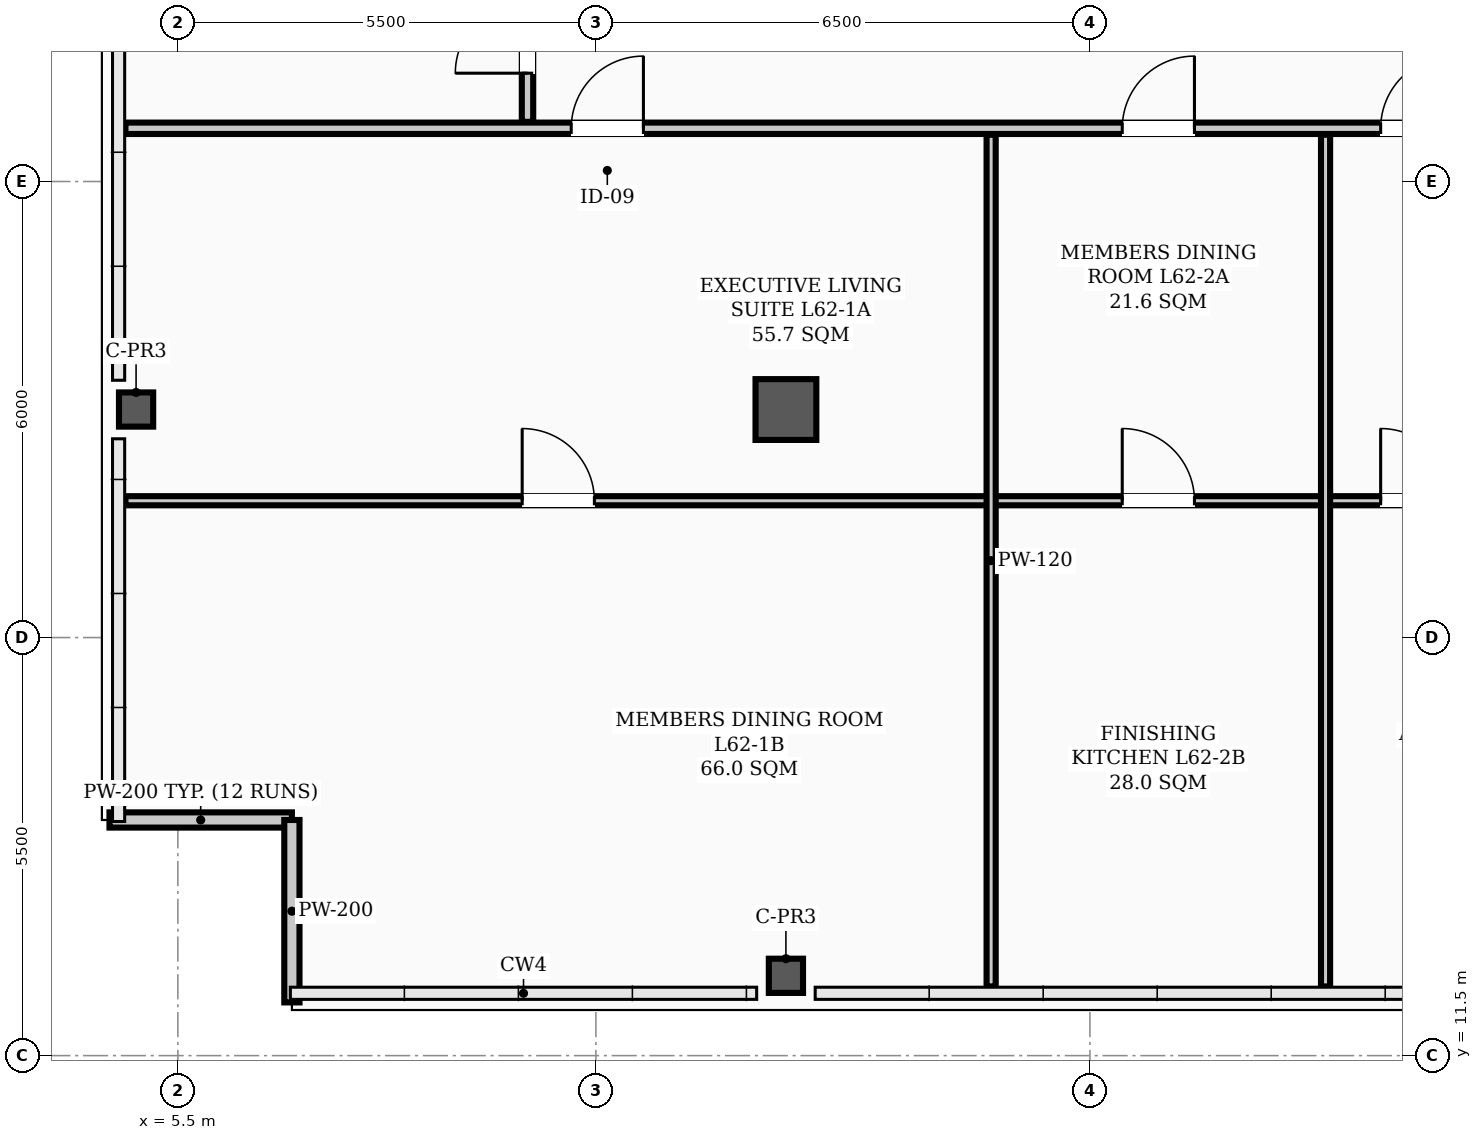
"""IFC4 building model, lengths in metres.
Left out: names, types, materials, properties, quantities, classifications, styles, units other than length and angle.
Written with IfcOpenShell. Run it as: python <this file> out.ifc"""

import sys

from ifc_helpers import new_model, si_unit, direction, frame, frame_2d, origin, origin_2d, place, context, subcontext, project, spatial, rectangle, hollow_rectangle, extrude, element, fill, save


model = new_model("IFC4")
c1 = context("Model", 3, precision=1e-05, world=origin(), true_north=direction((0.0, 1.0)))
c2 = subcontext(c1, "Body", "Model", "MODEL_VIEW")
j1 = project(units=[si_unit("LENGTHUNIT", "METRE"), si_unit("PLANEANGLEUNIT", "RADIAN")], contexts=[c1])
p1 = place(None, origin())
s1 = spatial("IfcSite", under=j1, at=p1, CompositionType="ELEMENT")
p2 = place(p1, origin())
s2 = spatial("IfcBuilding", under=s1, at=p2, CompositionType="ELEMENT")
p3 = place(p2, frame((0.0, 0.0, 250.1)))
s3 = spatial("IfcBuildingStorey", under=s2, at=p3, CompositionType="ELEMENT", Elevation=250.1)
p4 = place(p3, frame((13.5, 20.0, 0.0), z_axis=(0.0, 0.0, 1.0), x_axis=(1.0, 0.0, 0.0)))
e1 = element("IfcColumn", 1, at=p4, inside=s3, PredefinedType="COLUMN", context=c2, shape_type="SweptSolid", body=[
    extrude(hollow_rectangle(XDim=0.8, YDim=0.8, WallThickness=0.032, InnerFilletRadius=0.016, OuterFilletRadius=0.048, at=origin_2d()), origin(), (0.0, 0.0, 1.0), 3.9),
])
for number, where, z_axis, x_axis in (
    (2, (4.95, 20.0, 0.0), (0.0, 0.0, 1.0), (1.0, 0.0, 0.0)),
    (3, (13.5, 12.55, 0.0), (0.0, 0.0, 1.0), (1.0, 0.0, 0.0)),
):
    element("IfcColumn", number, at=place(p3, frame(where, z_axis=z_axis, x_axis=x_axis)), inside=s3, PredefinedType="COLUMN", context=c2, shape_type="SweptSolid", body=[
        extrude(hollow_rectangle(XDim=0.45, YDim=0.45, WallThickness=0.022, InnerFilletRadius=0.022, OuterFilletRadius=0.044, at=origin_2d()), origin(), (0.0, 0.0, 1.0), 3.9),
    ])
p5 = place(p3, frame((4.6, 14.6, 0.0), z_axis=(0.0, 0.0, 1.0), x_axis=(1.0, 0.0, 0.0)))
e4 = element("IfcWall", 4, at=p5, inside=s3, PredefinedType="PARAPET", context=c2, shape_type="SweptSolid", body=[
    extrude(rectangle(XDim=2.4, YDim=0.2, at=frame_2d((1.2, 0.0))), origin(), (0.0, 0.0, 1.0), 1.2),
])
p6 = place(p3, frame((7.0, 14.6, 0.0), z_axis=(0.0, 0.0, 1.0), x_axis=(0.0, -1.0, 0.0)))
e5 = element("IfcWall", 5, at=p6, inside=s3, PredefinedType="PARAPET", context=c2, shape_type="SweptSolid", body=[
    extrude(rectangle(XDim=2.4, YDim=0.2, at=frame_2d((1.2, 0.0))), origin(), (0.0, 0.0, 1.0), 1.2),
])
p7 = place(p3, frame((4.81, 23.7, 0.0), z_axis=(0.0, 0.0, 1.0), x_axis=(1.0, 0.0, 0.0)))
e6 = element("IfcWall", 6, at=p7, inside=s3, PredefinedType="PARTITIONING", context=c2, shape_type="SweptSolid", body=[
    extrude(rectangle(XDim=40.88, YDim=0.15, at=frame_2d((20.44, 0.0))), origin(), (0.0, 0.0, 1.0), 3.2),
])
p8 = place(p7, frame((5.865, 0.0, 0.0)))
e7 = element("IfcOpeningElement", 7, at=p8, cuts=e6, PredefinedType="OPENING", context=c2, shape_type="SweptSolid", body=[
    extrude(rectangle(XDim=0.95, YDim=2.08, at=frame_2d((0.475, 1.04))), frame((0.0, 0.085, 0.0), z_axis=(0.0, -1.0, 0.0), x_axis=(1.0, 0.0, 0.0)), (0.0, 0.0, 1.0), 0.17),
])
p9 = place(p7, frame((13.115, 0.0, 0.0)))
e8 = element("IfcOpeningElement", 8, at=p9, cuts=e6, PredefinedType="OPENING", context=c2, shape_type="SweptSolid", body=[
    extrude(rectangle(XDim=0.95, YDim=2.08, at=frame_2d((0.475, 1.04))), frame((0.0, 0.085, 0.0), z_axis=(0.0, -1.0, 0.0), x_axis=(1.0, 0.0, 0.0)), (0.0, 0.0, 1.0), 0.17),
])
p10 = place(p7, frame((16.515, 0.0, 0.0)))
e9 = element("IfcOpeningElement", 9, at=p10, cuts=e6, PredefinedType="OPENING", context=c2, shape_type="SweptSolid", body=[
    extrude(rectangle(XDim=0.95, YDim=2.08, at=frame_2d((0.475, 1.04))), frame((0.0, 0.085, 0.0), z_axis=(0.0, -1.0, 0.0), x_axis=(1.0, 0.0, 0.0)), (0.0, 0.0, 1.0), 0.17),
])
p11 = place(p7, frame((22.915, 0.0, 0.0)))
e10 = element("IfcOpeningElement", 10, at=p11, cuts=e6, PredefinedType="OPENING", context=c2, shape_type="SweptSolid", body=[
    extrude(rectangle(XDim=0.95, YDim=2.08, at=frame_2d((0.475, 1.04))), frame((0.0, 0.085, 0.0), z_axis=(0.0, -1.0, 0.0), x_axis=(1.0, 0.0, 0.0)), (0.0, 0.0, 1.0), 0.17),
])
p12 = place(p7, frame((29.115, 0.0, 0.0)))
e11 = element("IfcOpeningElement", 11, at=p12, cuts=e6, PredefinedType="OPENING", context=c2, shape_type="SweptSolid", body=[
    extrude(rectangle(XDim=0.95, YDim=2.08, at=frame_2d((0.475, 1.04))), frame((0.0, 0.085, 0.0), z_axis=(0.0, -1.0, 0.0), x_axis=(1.0, 0.0, 0.0)), (0.0, 0.0, 1.0), 0.17),
])
p13 = place(p7, frame((34.215, 0.0, 0.0)))
e12 = element("IfcOpeningElement", 12, at=p13, cuts=e6, PredefinedType="OPENING", context=c2, shape_type="SweptSolid", body=[
    extrude(rectangle(XDim=0.95, YDim=2.08, at=frame_2d((0.475, 1.04))), frame((0.0, 0.085, 0.0), z_axis=(0.0, -1.0, 0.0), x_axis=(1.0, 0.0, 0.0)), (0.0, 0.0, 1.0), 0.17),
])
p14 = place(p7, frame((38.46, 0.0, 0.0)))
e13 = element("IfcOpeningElement", 13, at=p14, cuts=e6, PredefinedType="OPENING", context=c2, shape_type="SweptSolid", body=[
    extrude(rectangle(XDim=0.95, YDim=2.08, at=frame_2d((0.475, 1.04))), frame((0.0, 0.085, 0.0), z_axis=(0.0, -1.0, 0.0), x_axis=(1.0, 0.0, 0.0)), (0.0, 0.0, 1.0), 0.17),
])
p15 = place(p3, frame((4.81, 18.8, 0.0), z_axis=(0.0, 0.0, 1.0), x_axis=(1.0, 0.0, 0.0)))
e14 = element("IfcWall", 14, at=p15, inside=s3, PredefinedType="PARTITIONING", context=c2, shape_type="SweptSolid", body=[
    extrude(rectangle(XDim=11.39, YDim=0.12, at=frame_2d((5.695, 0.0))), origin(), (0.0, 0.0, 1.0), 3.2),
])
p16 = place(p15, frame((5.22, 0.0, 0.0)))
e15 = element("IfcOpeningElement", 15, at=p16, cuts=e14, PredefinedType="OPENING", context=c2, shape_type="SweptSolid", body=[
    extrude(rectangle(XDim=0.95, YDim=2.08, at=frame_2d((0.475, 1.04))), frame((0.0, 0.07, 0.0), z_axis=(0.0, -1.0, 0.0), x_axis=(1.0, 0.0, 0.0)), (0.0, 0.0, 1.0), 0.14),
])
p17 = place(p3, frame((16.2, 18.8, 0.0), z_axis=(0.0, 0.0, 1.0), x_axis=(1.0, 0.0, 0.0)))
e16 = element("IfcWall", 16, at=p17, inside=s3, PredefinedType="PARTITIONING", context=c2, shape_type="SweptSolid", body=[
    extrude(rectangle(XDim=4.4, YDim=0.12, at=frame_2d((2.2, 0.0))), origin(), (0.0, 0.0, 1.0), 3.35),
])
p18 = place(p17, frame((1.725, 0.0, 0.0)))
e17 = element("IfcOpeningElement", 17, at=p18, cuts=e16, PredefinedType="OPENING", context=c2, shape_type="SweptSolid", body=[
    extrude(rectangle(XDim=0.95, YDim=2.08, at=frame_2d((0.475, 1.04))), frame((0.0, 0.07, 0.0), z_axis=(0.0, -1.0, 0.0), x_axis=(1.0, 0.0, 0.0)), (0.0, 0.0, 1.0), 0.14),
])
p19 = place(p3, frame((20.6, 18.8, 0.0), z_axis=(0.0, 0.0, 1.0), x_axis=(1.0, 0.0, 0.0)))
e18 = element("IfcWall", 18, at=p19, inside=s3, PredefinedType="PARTITIONING", context=c2, shape_type="SweptSolid", body=[
    extrude(rectangle(XDim=4.2, YDim=0.12, at=frame_2d((2.1, 0.0))), origin(), (0.0, 0.0, 1.0), 3.2),
])
p20 = place(p19, frame((0.725, 0.0, 0.0)))
e19 = element("IfcOpeningElement", 19, at=p20, cuts=e18, PredefinedType="OPENING", context=c2, shape_type="SweptSolid", body=[
    extrude(rectangle(XDim=0.95, YDim=2.08, at=frame_2d((0.475, 1.04))), frame((0.0, 0.07, 0.0), z_axis=(0.0, -1.0, 0.0), x_axis=(1.0, 0.0, 0.0)), (0.0, 0.0, 1.0), 0.14),
])
p21 = place(p3, frame((10.1, 23.785, 0.0), z_axis=(0.0, 0.0, 1.0), x_axis=(0.0, 1.0, 0.0)))
e20 = element("IfcWall", 20, at=p21, inside=s3, PredefinedType="PARTITIONING", context=c2, shape_type="SweptSolid", body=[
    extrude(rectangle(XDim=12.28, YDim=0.15, at=frame_2d((6.14, 0.0))), origin(), (0.0, 0.0, 1.0), 3.1),
])
p22 = place(p21, frame((0.64, 0.0, 0.0)))
e21 = element("IfcOpeningElement", 21, at=p22, cuts=e20, PredefinedType="OPENING", context=c2, shape_type="SweptSolid", body=[
    extrude(rectangle(XDim=0.95, YDim=2.08, at=frame_2d((0.475, 1.04))), frame((0.0, 0.085, 0.0), z_axis=(0.0, -1.0, 0.0), x_axis=(1.0, 0.0, 0.0)), (0.0, 0.0, 1.0), 0.17),
])
for number, where, z_axis, x_axis in (
    (22, (16.2, 12.41, 0.0), (0.0, 0.0, 1.0), (0.0, 1.0, 0.0)),
    (23, (20.6, 12.41, 0.0), (0.0, 0.0, 1.0), (0.0, 1.0, 0.0)),
):
    element("IfcWall", number, at=place(p3, frame(where, z_axis=z_axis, x_axis=x_axis)), inside=s3, PredefinedType="PARTITIONING", context=c2, shape_type="SweptSolid", body=[
        extrude(rectangle(XDim=11.205, YDim=0.12, at=frame_2d((5.603, 0.0))), origin(), (0.0, 0.0, 1.0), 3.1),
    ])
p23 = place(p16, origin())
e24 = element("IfcDoor", 24, at=p23, inside=s3, OperationType="SINGLE_SWING_LEFT", PredefinedType="DOOR", context=c2, shape_type="SweptSolid", body=[
    extrude(rectangle(XDim=0.95, YDim=2.08, at=frame_2d((0.475, 1.04))), frame((0.0, 0.025, 0.0), z_axis=(0.0, -1.0, 0.0), x_axis=(1.0, 0.0, 0.0)), (0.0, 0.0, 1.0), 0.05),
])
fill(e15, e24)
p24 = place(p8, origin())
e25 = element("IfcDoor", 25, at=p24, inside=s3, OperationType="SINGLE_SWING_RIGHT", PredefinedType="DOOR", context=c2, shape_type="SweptSolid", body=[
    extrude(rectangle(XDim=0.95, YDim=2.08, at=frame_2d((0.475, 1.04))), frame((0.0, 0.025, 0.0), z_axis=(0.0, -1.0, 0.0), x_axis=(1.0, 0.0, 0.0)), (0.0, 0.0, 1.0), 0.05),
])
fill(e7, e25)
p25 = place(p18, origin())
e26 = element("IfcDoor", 26, at=p25, inside=s3, OperationType="SINGLE_SWING_LEFT", PredefinedType="DOOR", context=c2, shape_type="SweptSolid", body=[
    extrude(rectangle(XDim=0.95, YDim=2.08, at=frame_2d((0.475, 1.04))), frame((0.0, 0.025, 0.0), z_axis=(0.0, -1.0, 0.0), x_axis=(1.0, 0.0, 0.0)), (0.0, 0.0, 1.0), 0.05),
])
fill(e17, e26)
p26 = place(p9, origin())
e27 = element("IfcDoor", 27, at=p26, inside=s3, OperationType="SINGLE_SWING_RIGHT", PredefinedType="DOOR", context=c2, shape_type="SweptSolid", body=[
    extrude(rectangle(XDim=0.95, YDim=2.08, at=frame_2d((0.475, 1.04))), frame((0.0, 0.025, 0.0), z_axis=(0.0, -1.0, 0.0), x_axis=(1.0, 0.0, 0.0)), (0.0, 0.0, 1.0), 0.05),
])
fill(e8, e27)
p27 = place(p20, origin())
e28 = element("IfcDoor", 28, at=p27, inside=s3, OperationType="SINGLE_SWING_LEFT", PredefinedType="DOOR", context=c2, shape_type="SweptSolid", body=[
    extrude(rectangle(XDim=0.95, YDim=2.08, at=frame_2d((0.475, 1.04))), frame((0.0, 0.025, 0.0), z_axis=(0.0, -1.0, 0.0), x_axis=(1.0, 0.0, 0.0)), (0.0, 0.0, 1.0), 0.05),
])
fill(e19, e28)
p28 = place(p10, origin())
e29 = element("IfcDoor", 29, at=p28, inside=s3, OperationType="SINGLE_SWING_RIGHT", PredefinedType="DOOR", context=c2, shape_type="SweptSolid", body=[
    extrude(rectangle(XDim=0.95, YDim=2.08, at=frame_2d((0.475, 1.04))), frame((0.0, 0.025, 0.0), z_axis=(0.0, -1.0, 0.0), x_axis=(1.0, 0.0, 0.0)), (0.0, 0.0, 1.0), 0.05),
])
fill(e9, e29)
p29 = place(p22, origin())
e30 = element("IfcDoor", 30, at=p29, inside=s3, OperationType="SINGLE_SWING_LEFT", PredefinedType="DOOR", context=c2, shape_type="SweptSolid", body=[
    extrude(rectangle(XDim=0.95, YDim=2.08, at=frame_2d((0.475, 1.04))), frame((0.0, 0.025, 0.0), z_axis=(0.0, -1.0, 0.0), x_axis=(1.0, 0.0, 0.0)), (0.0, 0.0, 1.0), 0.05),
])
fill(e21, e30)
save(model, sys.argv[1])
